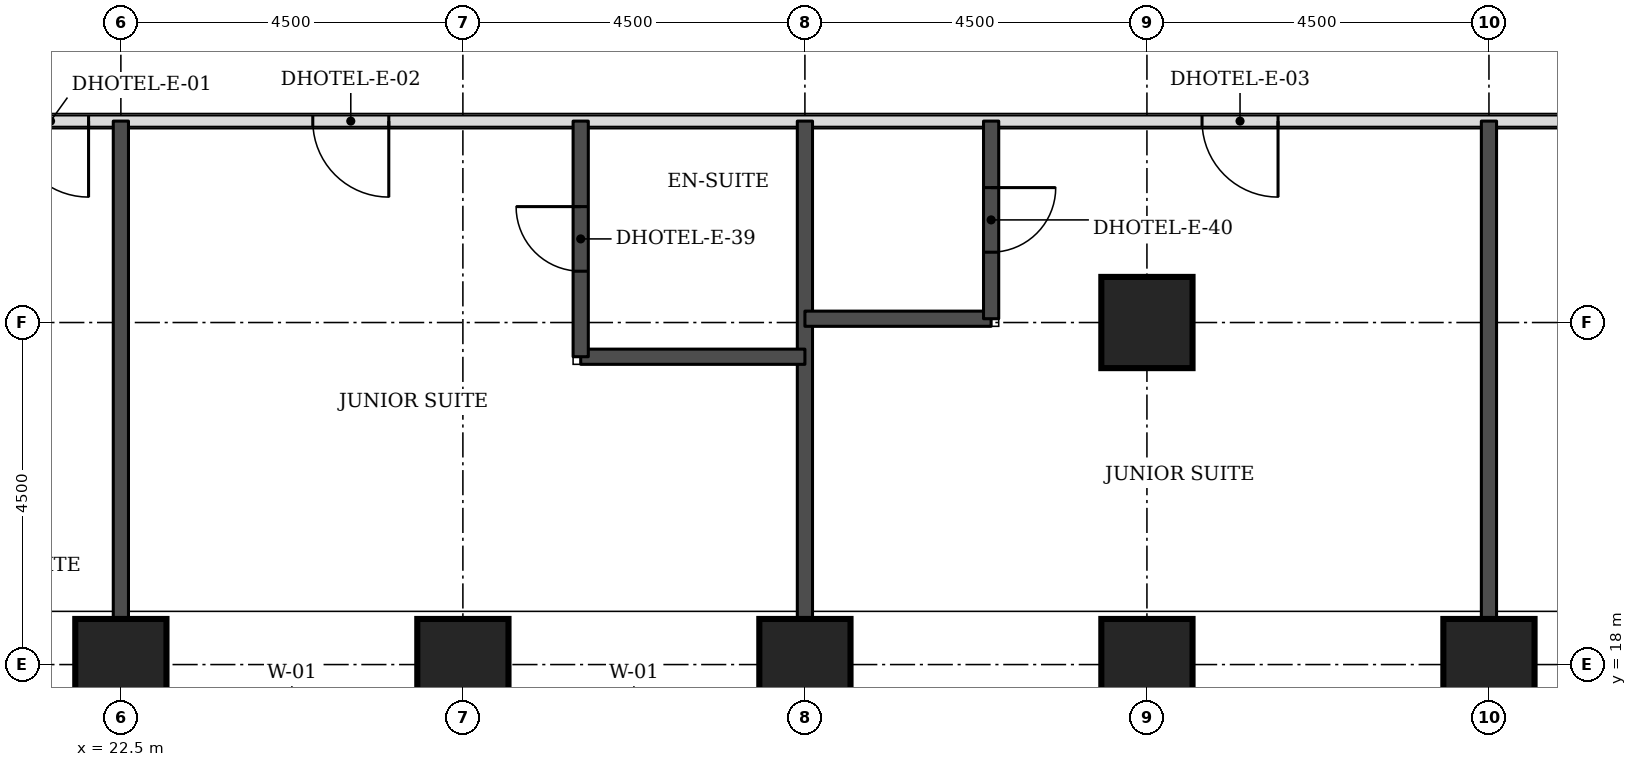
"""IFC4 building model, lengths in metres.
Left out: names, types, materials, properties, quantities, classifications, styles, units other than length and angle.
Written with IfcOpenShell. Run it as: python <this file> out.ifc"""

import sys

from ifc_helpers import new_model, si_unit, direction, frame, frame_2d, origin, origin_2d, place, context, subcontext, project, spatial, rectangle, extrude, element, fill, save


model = new_model("IFC4")
c1 = context("Model", 3, precision=1e-05, world=origin(), true_north=direction((0.0, 1.0)))
c2 = subcontext(c1, "Body", "Model", "MODEL_VIEW")
j1 = project(units=[si_unit("LENGTHUNIT", "METRE"), si_unit("PLANEANGLEUNIT", "RADIAN")], contexts=[c1])
p1 = place(None, origin())
s1 = spatial("IfcSite", under=j1, at=p1, CompositionType="ELEMENT")
p2 = place(p1, origin())
s2 = spatial("IfcBuilding", under=s1, at=p2, CompositionType="ELEMENT")
p3 = place(p2, frame((0.0, 0.0, 39.6)))
s3 = spatial("IfcBuildingStorey", under=s2, at=p3, CompositionType="ELEMENT", Elevation=39.6)
for number, where, z_axis, x_axis in (
    (1, (22.5, 18.0, 0.0), (0.0, 0.0, 1.0), (1.0, 0.0, 0.0)),
    (2, (27.0, 18.0, 0.0), (0.0, 0.0, 1.0), (1.0, 0.0, 0.0)),
    (3, (31.5, 18.0, 0.0), (0.0, 0.0, 1.0), (1.0, 0.0, 0.0)),
    (4, (36.0, 18.0, 0.0), (0.0, 0.0, 1.0), (1.0, 0.0, 0.0)),
    (5, (40.5, 18.0, 0.0), (0.0, 0.0, 1.0), (1.0, 0.0, 0.0)),
    (6, (36.0, 22.5, 0.0), (0.0, 0.0, 1.0), (1.0, 0.0, 0.0)),
):
    element("IfcColumn", number, at=place(p3, frame(where, z_axis=z_axis, x_axis=x_axis)), inside=s3, PredefinedType="COLUMN", context=c2, shape_type="SweptSolid", body=[
        extrude(rectangle(XDim=1.2, YDim=1.2, at=origin_2d()), origin(), (0.0, 0.0, 1.0), 3.3),
    ])
p4 = place(p3, frame((20.65, 25.15, 0.0), z_axis=(0.0, 0.0, 1.0), x_axis=(1.0, 0.0, 0.0)))
e7 = element("IfcWall", 7, at=p4, inside=s3, PredefinedType="PARTITIONING", context=c2, shape_type="SweptSolid", body=[
    extrude(rectangle(XDim=32.2, YDim=0.15, at=frame_2d((16.1, 0.0))), origin(), (0.0, 0.0, 1.0), 3.08),
])
p5 = place(p4, frame((4.375, 0.0, 0.0)))
e8 = element("IfcOpeningElement", 8, at=p5, cuts=e7, PredefinedType="OPENING", context=c2, shape_type="SweptSolid", body=[
    extrude(rectangle(XDim=1.0, YDim=2.1, at=frame_2d((0.5, 1.05))), frame((0.0, 0.085, 0.0), z_axis=(0.0, -1.0, 0.0), x_axis=(1.0, 0.0, 0.0)), (0.0, 0.0, 1.0), 0.17),
])
p6 = place(p4, frame((16.075, 0.0, 0.0)))
e9 = element("IfcOpeningElement", 9, at=p6, cuts=e7, PredefinedType="OPENING", context=c2, shape_type="SweptSolid", body=[
    extrude(rectangle(XDim=1.0, YDim=2.1, at=frame_2d((0.5, 1.05))), frame((0.0, 0.085, 0.0), z_axis=(0.0, -1.0, 0.0), x_axis=(1.0, 0.0, 0.0)), (0.0, 0.0, 1.0), 0.17),
])
p7 = place(p4, frame((22.375, 0.0, 0.0)))
e10 = element("IfcOpeningElement", 10, at=p7, cuts=e7, PredefinedType="OPENING", context=c2, shape_type="SweptSolid", body=[
    extrude(rectangle(XDim=1.0, YDim=2.1, at=frame_2d((0.5, 1.05))), frame((0.0, 0.085, 0.0), z_axis=(0.0, -1.0, 0.0), x_axis=(1.0, 0.0, 0.0)), (0.0, 0.0, 1.0), 0.17),
])
p8 = place(p4, frame((0.425, 0.0, 0.0)))
e11 = element("IfcOpeningElement", 11, at=p8, cuts=e7, PredefinedType="OPENING", context=c2, shape_type="SweptSolid", body=[
    extrude(rectangle(XDim=1.0, YDim=2.1, at=frame_2d((0.5, 1.05))), frame((0.0, 0.085, 0.0), z_axis=(0.0, -1.0, 0.0), x_axis=(1.0, 0.0, 0.0)), (0.0, 0.0, 1.0), 0.17),
])
p9 = place(p4, frame((30.025, 0.0, 0.0)))
e12 = element("IfcOpeningElement", 12, at=p9, cuts=e7, PredefinedType="OPENING", context=c2, shape_type="SweptSolid", body=[
    extrude(rectangle(XDim=1.0, YDim=2.1, at=frame_2d((0.5, 1.05))), frame((0.0, 0.085, 0.0), z_axis=(0.0, -1.0, 0.0), x_axis=(1.0, 0.0, 0.0)), (0.0, 0.0, 1.0), 0.17),
])
for number, where, z_axis, x_axis in (
    (13, (22.5, 18.6, 0.0), (0.0, 0.0, 1.0), (0.0, 1.0, 0.0)),
    (14, (31.5, 18.6, 0.0), (0.0, 0.0, 1.0), (0.0, 1.0, 0.0)),
    (15, (40.5, 18.6, 0.0), (0.0, 0.0, 1.0), (0.0, 1.0, 0.0)),
):
    element("IfcWall", number, at=place(p3, frame(where, z_axis=z_axis, x_axis=x_axis)), inside=s3, PredefinedType="SOLIDWALL", context=c2, shape_type="SweptSolid", body=[
        extrude(rectangle(XDim=6.55, YDim=0.2, at=frame_2d((3.275, 0.0))), origin(), (0.0, 0.0, 1.0), 3.08),
    ])
p10 = place(p3, frame((28.55, 22.05, 0.0), z_axis=(0.0, 0.0, 1.0), x_axis=(1.0, 0.0, 0.0)))
e16 = element("IfcWall", 16, at=p10, inside=s3, PredefinedType="SOLIDWALL", context=c2, shape_type="SweptSolid", body=[
    extrude(rectangle(XDim=2.95, YDim=0.2, at=frame_2d((1.475, 0.0))), origin(), (0.0, 0.0, 1.0), 3.08),
])
p11 = place(p3, frame((28.55, 22.05, 0.0), z_axis=(0.0, 0.0, 1.0), x_axis=(0.0, 1.0, 0.0)))
e17 = element("IfcWall", 17, at=p11, inside=s3, PredefinedType="SOLIDWALL", context=c2, shape_type="SweptSolid", body=[
    extrude(rectangle(XDim=3.1, YDim=0.2, at=frame_2d((1.55, 0.0))), origin(), (0.0, 0.0, 1.0), 3.08),
])
p12 = place(p11, frame((1.125, 0.0, 0.0)))
e18 = element("IfcOpeningElement", 18, at=p12, cuts=e17, PredefinedType="OPENING", context=c2, shape_type="SweptSolid", body=[
    extrude(rectangle(XDim=0.85, YDim=2.1, at=frame_2d((0.425, 1.05))), frame((0.0, 0.11, 0.0), z_axis=(0.0, -1.0, 0.0), x_axis=(1.0, 0.0, 0.0)), (0.0, 0.0, 1.0), 0.22),
])
p13 = place(p3, frame((31.5, 22.55, 0.0), z_axis=(0.0, 0.0, 1.0), x_axis=(1.0, 0.0, 0.0)))
e19 = element("IfcWall", 19, at=p13, inside=s3, PredefinedType="SOLIDWALL", context=c2, shape_type="SweptSolid", body=[
    extrude(rectangle(XDim=2.45, YDim=0.2, at=frame_2d((1.225, 0.0))), origin(), (0.0, 0.0, 1.0), 3.08),
])
p14 = place(p3, frame((33.95, 22.55, 0.0), z_axis=(0.0, 0.0, 1.0), x_axis=(0.0, 1.0, 0.0)))
e20 = element("IfcWall", 20, at=p14, inside=s3, PredefinedType="SOLIDWALL", context=c2, shape_type="SweptSolid", body=[
    extrude(rectangle(XDim=2.6, YDim=0.2, at=frame_2d((1.3, 0.0))), origin(), (0.0, 0.0, 1.0), 3.08),
])
p15 = place(p14, frame((0.875, 0.0, 0.0)))
e21 = element("IfcOpeningElement", 21, at=p15, cuts=e20, PredefinedType="OPENING", context=c2, shape_type="SweptSolid", body=[
    extrude(rectangle(XDim=0.85, YDim=2.1, at=frame_2d((0.425, 1.05))), frame((0.0, 0.11, 0.0), z_axis=(0.0, -1.0, 0.0), x_axis=(1.0, 0.0, 0.0)), (0.0, 0.0, 1.0), 0.22),
])
p16 = place(p5, frame((1.0, 0.0, 0.0), z_axis=(0.0, 0.0, 1.0), x_axis=(-1.0, 0.0, 0.0)))
e22 = element("IfcDoor", 22, at=p16, inside=s3, OperationType="SINGLE_SWING_LEFT", PredefinedType="DOOR", context=c2, shape_type="SweptSolid", body=[
    extrude(rectangle(XDim=1.0, YDim=2.1, at=frame_2d((0.5, 1.05))), frame((0.0, 0.025, 0.0), z_axis=(0.0, -1.0, 0.0), x_axis=(1.0, 0.0, 0.0)), (0.0, 0.0, 1.0), 0.05),
])
fill(e8, e22)
p17 = place(p12, origin())
e23 = element("IfcDoor", 23, at=p17, inside=s3, OperationType="SINGLE_SWING_RIGHT", PredefinedType="DOOR", context=c2, shape_type="SweptSolid", body=[
    extrude(rectangle(XDim=0.85, YDim=2.1, at=frame_2d((0.425, 1.05))), frame((0.0, 0.025, 0.0), z_axis=(0.0, -1.0, 0.0), x_axis=(1.0, 0.0, 0.0)), (0.0, 0.0, 1.0), 0.05),
])
fill(e18, e23)
p18 = place(p6, frame((1.0, 0.0, 0.0), z_axis=(0.0, 0.0, 1.0), x_axis=(-1.0, 0.0, 0.0)))
e24 = element("IfcDoor", 24, at=p18, inside=s3, OperationType="SINGLE_SWING_LEFT", PredefinedType="DOOR", context=c2, shape_type="SweptSolid", body=[
    extrude(rectangle(XDim=1.0, YDim=2.1, at=frame_2d((0.5, 1.05))), frame((0.0, 0.025, 0.0), z_axis=(0.0, -1.0, 0.0), x_axis=(1.0, 0.0, 0.0)), (0.0, 0.0, 1.0), 0.05),
])
fill(e9, e24)
p19 = place(p15, frame((0.85, 0.0, 0.0), z_axis=(0.0, 0.0, 1.0), x_axis=(-1.0, 0.0, 0.0)))
e25 = element("IfcDoor", 25, at=p19, inside=s3, OperationType="SINGLE_SWING_LEFT", PredefinedType="DOOR", context=c2, shape_type="SweptSolid", body=[
    extrude(rectangle(XDim=0.85, YDim=2.1, at=frame_2d((0.425, 1.05))), frame((0.0, 0.025, 0.0), z_axis=(0.0, -1.0, 0.0), x_axis=(1.0, 0.0, 0.0)), (0.0, 0.0, 1.0), 0.05),
])
fill(e21, e25)
p20 = place(p8, frame((1.0, 0.0, 0.0), z_axis=(0.0, 0.0, 1.0), x_axis=(-1.0, 0.0, 0.0)))
e26 = element("IfcDoor", 26, at=p20, inside=s3, OperationType="SINGLE_SWING_LEFT", PredefinedType="DOOR", context=c2, shape_type="SweptSolid", body=[
    extrude(rectangle(XDim=1.0, YDim=2.1, at=frame_2d((0.5, 1.05))), frame((0.0, 0.025, 0.0), z_axis=(0.0, -1.0, 0.0), x_axis=(1.0, 0.0, 0.0)), (0.0, 0.0, 1.0), 0.05),
])
fill(e11, e26)
save(model, sys.argv[1])
